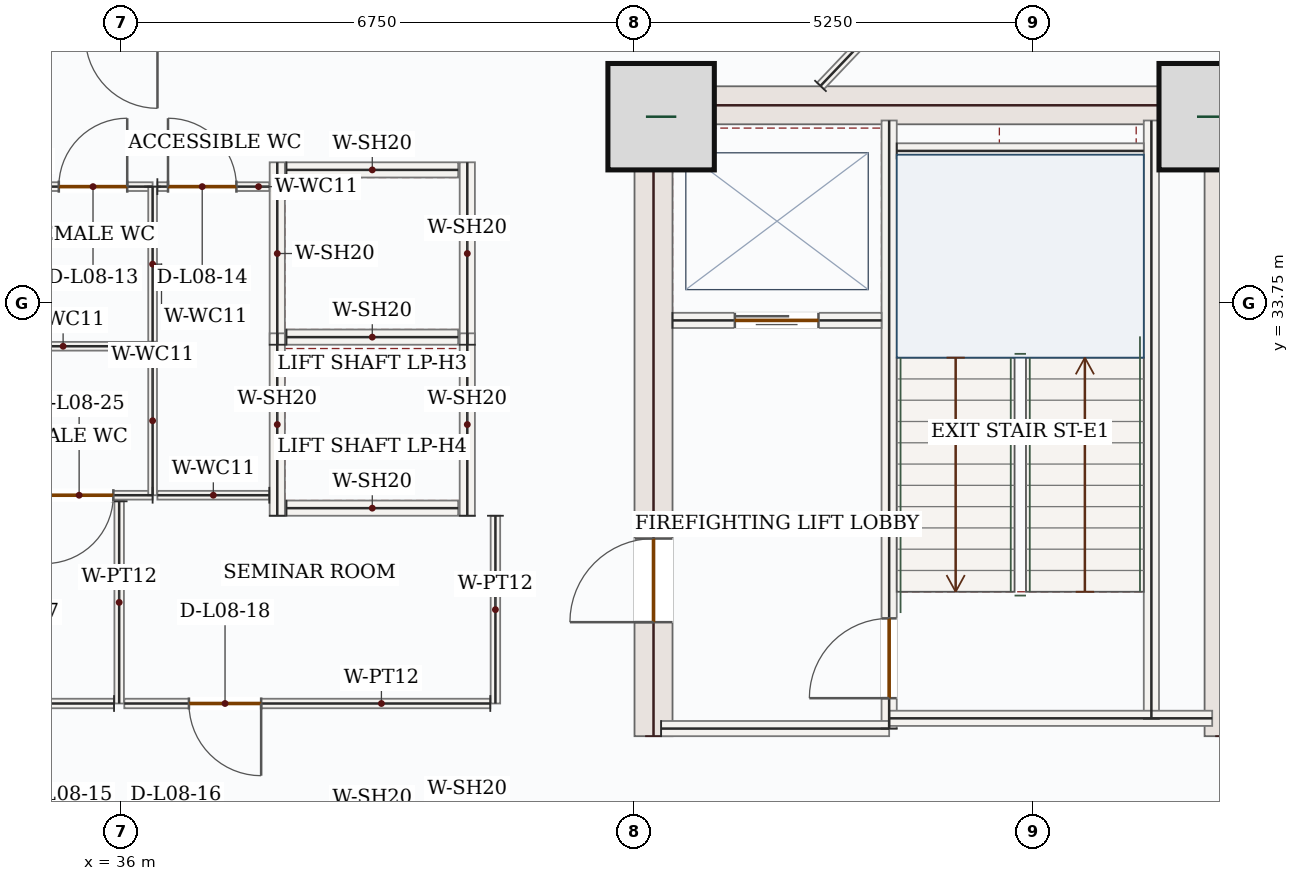
"""IFC4 building model, lengths in metres.
Left out: names, types, materials, properties, quantities, classifications, styles, units other than length and angle.
Written with IfcOpenShell. Run it as: python <this file> out.ifc"""

import sys

from ifc_helpers import new_model, si_unit, direction, frame, frame_2d, origin, origin_2d, place, context, subcontext, project, spatial, rectangle, extrude, source, transform, mapped, element, fill, save


model = new_model("IFC4")
c1 = context("Model", 3, precision=1e-05, world=origin(), true_north=direction((0.0, 1.0)))
c2 = subcontext(c1, "Body", "Model", "MODEL_VIEW")
j1 = project(units=[si_unit("LENGTHUNIT", "METRE"), si_unit("PLANEANGLEUNIT", "RADIAN")], contexts=[c1])
p1 = place(None, origin())
s1 = spatial("IfcSite", under=j1, at=p1, CompositionType="ELEMENT")
p2 = place(p1, origin())
s2 = spatial("IfcBuilding", under=s1, at=p2, CompositionType="ELEMENT")
p3 = place(p2, frame((0.0, 0.0, 41.7)))
s3 = spatial("IfcBuildingStorey", under=s2, at=p3, CompositionType="ELEMENT", Elevation=41.7)
p4 = place(p3, frame((43.0, 28.05, 0.0), z_axis=(0.0, 0.0, 1.0), x_axis=(0.0, 1.0, 0.0)))
e1 = element("IfcWall", 1, at=p4, inside=s3, PredefinedType="SHEAR", context=c2, shape_type="SweptSolid", body=[
    extrude(rectangle(XDim=8.55, YDim=0.5, at=frame_2d((4.275, 0.0))), origin(), (0.0, 0.0, 1.0), 3.95),
])
p5 = place(p4, frame((1.5, 0.0, 0.0)))
e2 = element("IfcOpeningElement", 2, at=p5, cuts=e1, PredefinedType="OPENING", context=c2, shape_type="SweptSolid", body=[
    extrude(rectangle(XDim=1.1, YDim=2.2, at=frame_2d((0.55, 1.1))), frame((0.0, 0.26, 0.0), z_axis=(0.0, -1.0, 0.0), x_axis=(1.0, 0.0, 0.0)), (0.0, 0.0, 1.0), 0.52),
])
m1 = source(origin(), c2, "Body", "SweptSolid", [
    extrude(rectangle(XDim=8.55, YDim=0.5, at=frame_2d((4.275, 0.0))), origin(), (0.0, 0.0, 1.0), 3.95),
])
p6 = place(p3, frame((50.5, 28.05, 0.0), z_axis=(0.0, 0.0, 1.0), x_axis=(0.0, 1.0, 0.0)))
e3 = element("IfcWall", 3, at=p6, inside=s3, PredefinedType="SHEAR", context=c2, shape_type="MappedRepresentation", body=[
    mapped(m1, transform((0.0, 0.0, 0.0), x_axis=(1.0, 0.0, 0.0), y_axis=(0.0, 1.0, 0.0), z_axis=(0.0, 0.0, 1.0), scale=1.0)),
])
m2 = source(origin(), c2, "Body", "SweptSolid", [
    extrude(rectangle(XDim=7.0, YDim=0.5, at=frame_2d((3.5, 0.0))), origin(), (0.0, 0.0, 1.0), 3.95),
])
p7 = place(p3, frame((43.25, 36.35, 0.0), z_axis=(0.0, 0.0, 1.0), x_axis=(1.0, 0.0, 0.0)))
e4 = element("IfcWall", 4, at=p7, inside=s3, PredefinedType="SHEAR", context=c2, shape_type="MappedRepresentation", body=[
    mapped(m2, transform((0.0, 0.0, 0.0), x_axis=(1.0, 0.0, 0.0), y_axis=(0.0, 1.0, 0.0), z_axis=(0.0, 0.0, 1.0), scale=1.0)),
])
m3 = source(origin(), c2, "Body", "SweptSolid", [
    extrude(rectangle(XDim=1.4, YDim=1.4, at=origin_2d()), origin(), (0.0, 0.0, 1.0), 4.2),
])
for number, where, z_axis, x_axis in (
    (5, (43.1, 36.2, 0.0), (0.0, 0.0, 1.0), (1.0, 0.0, 0.0)),
    (6, (50.35, 36.2, 0.0), (0.0, 0.0, 1.0), (1.0, 0.0, 0.0)),
):
    element("IfcColumn", number, at=place(p3, frame(where, z_axis=z_axis, x_axis=x_axis)), inside=s3, PredefinedType="COLUMN", context=c2, shape_type="MappedRepresentation", body=[
        mapped(m3, transform((0.0, 0.0, 0.0), x_axis=(1.0, 0.0, 0.0), y_axis=(0.0, 1.0, 0.0), z_axis=(0.0, 0.0, 1.0), scale=1.0)),
    ])
m4 = source(origin(), c2, "Body", "SweptSolid", [
    extrude(rectangle(XDim=5.258, YDim=0.32, at=frame_2d((2.629, 0.0))), origin(), (0.0, 0.0, 1.0), 3.95),
])
p8 = place(p3, frame((49.342, 39.26, 0.0), z_axis=(0.0, 0.0, 1.0), x_axis=(0.707106781187, -0.707106781187, 0.0)))
e7 = element("IfcWall", 7, at=p8, inside=s3, PredefinedType="SOLIDWALL", context=c2, shape_type="MappedRepresentation", body=[
    mapped(m4, transform((0.0, 0.0, 0.0), x_axis=(1.0, 0.0, 0.0), y_axis=(0.0, 1.0, 0.0), z_axis=(0.0, 0.0, 1.0), scale=1.0)),
])
m5 = source(origin(), c2, "Body", "SweptSolid", [
    extrude(rectangle(XDim=7.87, YDim=0.2, at=frame_2d((3.935, 0.0))), origin(), (0.0, 0.0, 1.0), 3.95),
])
p9 = place(p3, frame((49.55, 28.28, 0.0), z_axis=(0.0, 0.0, 1.0), x_axis=(0.0, 1.0, 0.0)))
e8 = element("IfcWall", 8, at=p9, inside=s3, PredefinedType="SOLIDWALL", context=c2, shape_type="MappedRepresentation", body=[
    mapped(m5, transform((0.0, 0.0, 0.0), x_axis=(1.0, 0.0, 0.0), y_axis=(0.0, 1.0, 0.0), z_axis=(0.0, 0.0, 1.0), scale=1.0)),
])
p10 = place(p3, frame((46.1, 28.15, 0.0), z_axis=(0.0, 0.0, 1.0), x_axis=(0.0, 1.0, 0.0)))
e9 = element("IfcWall", 9, at=p10, inside=s3, PredefinedType="SOLIDWALL", context=c2, shape_type="SweptSolid", body=[
    extrude(rectangle(XDim=8.0, YDim=0.2, at=frame_2d((4.0, 0.0))), origin(), (0.0, 0.0, 1.0), 3.95),
])
p11 = place(p10, frame((0.4, 0.0, 0.0)))
e10 = element("IfcOpeningElement", 10, at=p11, cuts=e9, PredefinedType="OPENING", context=c2, shape_type="SweptSolid", body=[
    extrude(rectangle(XDim=1.05, YDim=2.15, at=frame_2d((0.525, 1.075))), frame((0.0, 0.11, 0.0), z_axis=(0.0, -1.0, 0.0), x_axis=(1.0, 0.0, 0.0)), (0.0, 0.0, 1.0), 0.22),
])
m6 = source(origin(), c2, "Body", "SweptSolid", [
    extrude(rectangle(XDim=3.0, YDim=0.2, at=frame_2d((1.5, 0.0))), origin(), (0.0, 0.0, 1.0), 3.95),
])
p12 = place(p3, frame((43.1, 28.15, 0.0), z_axis=(0.0, 0.0, 1.0), x_axis=(1.0, 0.0, 0.0)))
e11 = element("IfcWall", 11, at=p12, inside=s3, PredefinedType="SOLIDWALL", context=c2, shape_type="MappedRepresentation", body=[
    mapped(m6, transform((0.0, 0.0, 0.0), x_axis=(1.0, 0.0, 0.0), y_axis=(0.0, 1.0, 0.0), z_axis=(0.0, 0.0, 1.0), scale=1.0)),
])
m7 = source(origin(), c2, "Body", "SweptSolid", [
    extrude(rectangle(XDim=4.25, YDim=0.2, at=frame_2d((2.125, 0.0))), origin(), (0.0, 0.0, 1.0), 3.95),
])
p13 = place(p3, frame((46.1, 28.285, 0.0), z_axis=(0.0, 0.0, 1.0), x_axis=(1.0, 0.0, 0.0)))
e12 = element("IfcWall", 12, at=p13, inside=s3, PredefinedType="SOLIDWALL", context=c2, shape_type="MappedRepresentation", body=[
    mapped(m7, transform((0.0, 0.0, 0.0), x_axis=(1.0, 0.0, 0.0), y_axis=(0.0, 1.0, 0.0), z_axis=(0.0, 0.0, 1.0), scale=1.0)),
])
m8 = source(origin(), c2, "Body", "SweptSolid", [
    extrude(rectangle(XDim=3.25, YDim=0.2, at=frame_2d((1.625, 0.0))), origin(), (0.0, 0.0, 1.0), 3.95),
])
p14 = place(p3, frame((46.2, 35.75, 0.0), z_axis=(0.0, 0.0, 1.0), x_axis=(1.0, 0.0, 0.0)))
e13 = element("IfcWall", 13, at=p14, inside=s3, PredefinedType="SOLIDWALL", context=c2, shape_type="MappedRepresentation", body=[
    mapped(m8, transform((0.0, 0.0, 0.0), x_axis=(1.0, 0.0, 0.0), y_axis=(0.0, 1.0, 0.0), z_axis=(0.0, 0.0, 1.0), scale=1.0)),
])
p15 = place(p3, frame((43.25, 33.52, 0.0), z_axis=(0.0, 0.0, 1.0), x_axis=(1.0, 0.0, 0.0)))
e14 = element("IfcWall", 14, at=p15, inside=s3, PredefinedType="SOLIDWALL", context=c2, shape_type="SweptSolid", body=[
    extrude(rectangle(XDim=2.75, YDim=0.2, at=frame_2d((1.375, 0.0))), origin(), (0.0, 0.0, 1.0), 3.95),
])
p16 = place(p15, frame((0.82, 0.0, 0.0)))
e15 = element("IfcOpeningElement", 15, at=p16, cuts=e14, PredefinedType="OPENING", context=c2, shape_type="SweptSolid", body=[
    extrude(rectangle(XDim=1.1, YDim=2.15, at=frame_2d((0.55, 1.075))), frame((0.0, 0.11, 0.0), z_axis=(0.0, -1.0, 0.0), x_axis=(1.0, 0.0, 0.0)), (0.0, 0.0, 1.0), 0.22),
])
m9 = source(origin(), c2, "Body", "SweptSolid", [
    extrude(rectangle(XDim=2.4, YDim=0.2, at=frame_2d((1.2, 0.0))), origin(), (0.0, 0.0, 1.0), 3.95),
])
for number, where, z_axis, x_axis in (
    (16, (38.05, 33.2, 0.0), (0.0, 0.0, 1.0), (0.0, 1.0, 0.0)),
    (17, (40.55, 33.2, 0.0), (0.0, 0.0, 1.0), (0.0, 1.0, 0.0)),
):
    element("IfcWall", number, at=place(p3, frame(where, z_axis=z_axis, x_axis=x_axis)), inside=s3, PredefinedType="SOLIDWALL", context=c2, shape_type="MappedRepresentation", body=[
        mapped(m9, transform((0.0, 0.0, 0.0), x_axis=(1.0, 0.0, 0.0), y_axis=(0.0, 1.0, 0.0), z_axis=(0.0, 0.0, 1.0), scale=1.0)),
    ])
m10 = source(origin(), c2, "Body", "SweptSolid", [
    extrude(rectangle(XDim=2.26, YDim=0.2, at=frame_2d((1.13, 0.0))), origin(), (0.0, 0.0, 1.0), 3.95),
])
for number, where, z_axis, x_axis in (
    (18, (38.17, 33.3, 0.0), (0.0, 0.0, 1.0), (1.0, 0.0, 0.0)),
    (19, (38.17, 35.5, 0.0), (0.0, 0.0, 1.0), (1.0, 0.0, 0.0)),
):
    element("IfcWall", number, at=place(p3, frame(where, z_axis=z_axis, x_axis=x_axis)), inside=s3, PredefinedType="SOLIDWALL", context=c2, shape_type="MappedRepresentation", body=[
        mapped(m10, transform((0.0, 0.0, 0.0), x_axis=(1.0, 0.0, 0.0), y_axis=(0.0, 1.0, 0.0), z_axis=(0.0, 0.0, 1.0), scale=1.0)),
    ])
for number, where, z_axis, x_axis in (
    (20, (38.05, 30.95, 0.0), (0.0, 0.0, 1.0), (0.0, 1.0, 0.0)),
    (21, (40.55, 30.95, 0.0), (0.0, 0.0, 1.0), (0.0, 1.0, 0.0)),
):
    element("IfcWall", number, at=place(p3, frame(where, z_axis=z_axis, x_axis=x_axis)), inside=s3, PredefinedType="SOLIDWALL", context=c2, shape_type="MappedRepresentation", body=[
        mapped(m9, transform((0.0, 0.0, 0.0), x_axis=(1.0, 0.0, 0.0), y_axis=(0.0, 1.0, 0.0), z_axis=(0.0, 0.0, 1.0), scale=1.0)),
    ])
p17 = place(p3, frame((38.17, 31.05, 0.0), z_axis=(0.0, 0.0, 1.0), x_axis=(1.0, 0.0, 0.0)))
e22 = element("IfcWall", 22, at=p17, inside=s3, PredefinedType="SOLIDWALL", context=c2, shape_type="MappedRepresentation", body=[
    mapped(m10, transform((0.0, 0.0, 0.0), x_axis=(1.0, 0.0, 0.0), y_axis=(0.0, 1.0, 0.0), z_axis=(0.0, 0.0, 1.0), scale=1.0)),
])
p18 = place(p3, frame((36.41, 31.22, 0.0), z_axis=(0.0, 0.0, 1.0), x_axis=(-1.0, 0.0, 0.0)))
e23 = element("IfcWall", 23, at=p18, inside=s3, PredefinedType="PARTITIONING", context=c2, shape_type="SweptSolid", body=[
    extrude(rectangle(XDim=2.355, YDim=0.115, at=frame_2d((1.177, 0.0))), origin(), (0.0, 0.0, 1.0), 3.95),
])
p19 = place(p18, frame((0.517, 0.0, 0.0)))
e24 = element("IfcOpeningElement", 24, at=p19, cuts=e23, PredefinedType="OPENING", context=c2, shape_type="SweptSolid", body=[
    extrude(rectangle(XDim=0.9, YDim=2.1, at=frame_2d((0.45, 1.05))), frame((0.0, 0.067, 0.0), z_axis=(0.0, -1.0, 0.0), x_axis=(1.0, 0.0, 0.0)), (0.0, 0.0, 1.0), 0.135),
])
m11 = source(origin(), c2, "Body", "SweptSolid", [
    extrude(rectangle(XDim=2.355, YDim=0.115, at=frame_2d((1.177, 0.0))), origin(), (0.0, 0.0, 1.0), 3.95),
])
p20 = place(p3, frame((34.055, 33.18, 0.0), z_axis=(0.0, 0.0, 1.0), x_axis=(1.0, 0.0, 0.0)))
e25 = element("IfcWall", 25, at=p20, inside=s3, PredefinedType="PARTITIONING", context=c2, shape_type="MappedRepresentation", body=[
    mapped(m11, transform((0.0, 0.0, 0.0), x_axis=(1.0, 0.0, 0.0), y_axis=(0.0, 1.0, 0.0), z_axis=(0.0, 0.0, 1.0), scale=1.0)),
])
m12 = source(origin(), c2, "Body", "SweptSolid", [
    extrude(rectangle(XDim=1.96, YDim=0.115, at=frame_2d((0.98, 0.0))), origin(), (0.0, 0.0, 1.0), 3.95),
])
p21 = place(p3, frame((36.41, 33.18, 0.0), z_axis=(0.0, 0.0, 1.0), x_axis=(0.0, -1.0, 0.0)))
e26 = element("IfcWall", 26, at=p21, inside=s3, PredefinedType="PARTITIONING", context=c2, shape_type="MappedRepresentation", body=[
    mapped(m12, transform((0.0, 0.0, 0.0), x_axis=(1.0, 0.0, 0.0), y_axis=(0.0, 1.0, 0.0), z_axis=(0.0, 0.0, 1.0), scale=1.0)),
])
p22 = place(p3, frame((34.055, 35.28, 0.0), z_axis=(0.0, 0.0, 1.0), x_axis=(1.0, 0.0, 0.0)))
e27 = element("IfcWall", 27, at=p22, inside=s3, PredefinedType="PARTITIONING", context=c2, shape_type="SweptSolid", body=[
    extrude(rectangle(XDim=2.355, YDim=0.115, at=frame_2d((1.177, 0.0))), origin(), (0.0, 0.0, 1.0), 3.95),
])
p23 = place(p22, frame((1.121, 0.0, 0.0)))
e28 = element("IfcOpeningElement", 28, at=p23, cuts=e27, PredefinedType="OPENING", context=c2, shape_type="SweptSolid", body=[
    extrude(rectangle(XDim=0.9, YDim=2.1, at=frame_2d((0.45, 1.05))), frame((0.0, 0.067, 0.0), z_axis=(0.0, -1.0, 0.0), x_axis=(1.0, 0.0, 0.0)), (0.0, 0.0, 1.0), 0.135),
])
m13 = source(origin(), c2, "Body", "SweptSolid", [
    extrude(rectangle(XDim=2.04, YDim=0.115, at=frame_2d((1.02, 0.0))), origin(), (0.0, 0.0, 1.0), 3.95),
])
p24 = place(p3, frame((36.41, 35.28, 0.0), z_axis=(0.0, 0.0, 1.0), x_axis=(0.0, -1.0, 0.0)))
e29 = element("IfcWall", 29, at=p24, inside=s3, PredefinedType="PARTITIONING", context=c2, shape_type="MappedRepresentation", body=[
    mapped(m13, transform((0.0, 0.0, 0.0), x_axis=(1.0, 0.0, 0.0), y_axis=(0.0, 1.0, 0.0), z_axis=(0.0, 0.0, 1.0), scale=1.0)),
])
m14 = source(origin(), c2, "Body", "SweptSolid", [
    extrude(rectangle(XDim=1.473, YDim=0.115, at=frame_2d((0.736, 0.0))), origin(), (0.0, 0.0, 1.0), 3.95),
])
p25 = place(p3, frame((37.945, 31.22, 0.0), z_axis=(0.0, 0.0, 1.0), x_axis=(-1.0, 0.0, 0.0)))
e30 = element("IfcWall", 30, at=p25, inside=s3, PredefinedType="PARTITIONING", context=c2, shape_type="MappedRepresentation", body=[
    mapped(m14, transform((0.0, 0.0, 0.0), x_axis=(1.0, 0.0, 0.0), y_axis=(0.0, 1.0, 0.0), z_axis=(0.0, 0.0, 1.0), scale=1.0)),
])
p26 = place(p3, frame((36.472, 35.28, 0.0), z_axis=(0.0, 0.0, 1.0), x_axis=(1.0, 0.0, 0.0)))
e31 = element("IfcWall", 31, at=p26, inside=s3, PredefinedType="PARTITIONING", context=c2, shape_type="SweptSolid", body=[
    extrude(rectangle(XDim=1.473, YDim=0.115, at=frame_2d((0.736, 0.0))), origin(), (0.0, 0.0, 1.0), 3.95),
])
p27 = place(p26, frame((0.14, 0.0, 0.0)))
e32 = element("IfcOpeningElement", 32, at=p27, cuts=e31, PredefinedType="OPENING", context=c2, shape_type="SweptSolid", body=[
    extrude(rectangle(XDim=0.9, YDim=2.1, at=frame_2d((0.45, 1.05))), frame((0.0, 0.067, 0.0), z_axis=(0.0, -1.0, 0.0), x_axis=(1.0, 0.0, 0.0)), (0.0, 0.0, 1.0), 0.135),
])
m15 = source(origin(), c2, "Body", "SweptSolid", [
    extrude(rectangle(XDim=2.66, YDim=0.125, at=frame_2d((1.33, 0.0))), origin(), (0.0, 0.0, 1.0), 3.95),
])
p28 = place(p3, frame((35.97, 31.14, 0.0), z_axis=(0.0, 0.0, 1.0), x_axis=(0.0, -1.0, 0.0)))
e33 = element("IfcWall", 33, at=p28, inside=s3, PredefinedType="PARTITIONING", context=c2, shape_type="MappedRepresentation", body=[
    mapped(m15, transform((0.0, 0.0, 0.0), x_axis=(1.0, 0.0, 0.0), y_axis=(0.0, 1.0, 0.0), z_axis=(0.0, 0.0, 1.0), scale=1.0)),
])
p29 = place(p3, frame((35.903, 28.48, 0.0), z_axis=(0.0, 0.0, 1.0), x_axis=(-1.0, 0.0, 0.0)))
e34 = element("IfcWall", 34, at=p29, inside=s3, PredefinedType="PARTITIONING", context=c2, shape_type="SweptSolid", body=[
    extrude(rectangle(XDim=4.823, YDim=0.125, at=frame_2d((2.411, 0.0))), origin(), (0.0, 0.0, 1.0), 3.95),
])
p30 = place(p29, frame((0.852, 0.0, 0.0)))
e35 = element("IfcOpeningElement", 35, at=p30, cuts=e34, PredefinedType="OPENING", context=c2, shape_type="SweptSolid", body=[
    extrude(rectangle(XDim=0.95, YDim=2.15, at=frame_2d((0.475, 1.075))), frame((0.0, 0.073, 0.0), z_axis=(0.0, -1.0, 0.0), x_axis=(1.0, 0.0, 0.0)), (0.0, 0.0, 1.0), 0.145),
])
m16 = source(origin(), c2, "Body", "SweptSolid", [
    extrude(rectangle(XDim=2.47, YDim=0.125, at=frame_2d((1.235, 0.0))), origin(), (0.0, 0.0, 1.0), 3.95),
])
p31 = place(p3, frame((40.92, 30.95, 0.0), z_axis=(0.0, 0.0, 1.0), x_axis=(0.0, -1.0, 0.0)))
e36 = element("IfcWall", 36, at=p31, inside=s3, PredefinedType="PARTITIONING", context=c2, shape_type="MappedRepresentation", body=[
    mapped(m16, transform((0.0, 0.0, 0.0), x_axis=(1.0, 0.0, 0.0), y_axis=(0.0, 1.0, 0.0), z_axis=(0.0, 0.0, 1.0), scale=1.0)),
])
p32 = place(p3, frame((40.853, 28.48, 0.0), z_axis=(0.0, 0.0, 1.0), x_axis=(-1.0, 0.0, 0.0)))
e37 = element("IfcWall", 37, at=p32, inside=s3, PredefinedType="PARTITIONING", context=c2, shape_type="SweptSolid", body=[
    extrude(rectangle(XDim=4.815, YDim=0.125, at=frame_2d((2.407, 0.0))), origin(), (0.0, 0.0, 1.0), 3.95),
])
p33 = place(p32, frame((3.015, 0.0, 0.0)))
e38 = element("IfcOpeningElement", 38, at=p33, cuts=e37, PredefinedType="OPENING", context=c2, shape_type="SweptSolid", body=[
    extrude(rectangle(XDim=0.95, YDim=2.15, at=frame_2d((0.475, 1.075))), frame((0.0, 0.073, 0.0), z_axis=(0.0, -1.0, 0.0), x_axis=(1.0, 0.0, 0.0)), (0.0, 0.0, 1.0), 0.145),
])
m17 = source(origin(), c2, "Body", "SweptSolid", [
    extrude(rectangle(XDim=3.438, YDim=0.125, at=frame_2d((1.719, 0.0))), origin(), (0.0, 0.0, 1.0), 3.95),
])
p34 = place(p3, frame((45.197, 36.605, 0.0), z_axis=(0.0, 0.0, 1.0), x_axis=(0.689493786127, 0.724291597972, 0.0)))
e39 = element("IfcWall", 39, at=p34, inside=s3, PredefinedType="PARTITIONING", context=c2, shape_type="MappedRepresentation", body=[
    mapped(m17, transform((0.0, 0.0, 0.0), x_axis=(1.0, 0.0, 0.0), y_axis=(0.0, 1.0, 0.0), z_axis=(0.0, 0.0, 1.0), scale=1.0)),
])
m18 = source(origin(), c2, "Body", "SweptSolid", [
    extrude(rectangle(XDim=1.05, YDim=2.15, at=frame_2d((0.525, 1.075))), frame((0.0, 0.025, 0.0), z_axis=(0.0, -1.0, 0.0), x_axis=(1.0, 0.0, 0.0)), (0.0, 0.0, 1.0), 0.05),
])
p35 = place(p11, origin())
e40 = element("IfcDoor", 40, at=p35, inside=s3, OperationType="SINGLE_SWING_LEFT", PredefinedType="DOOR", context=c2, shape_type="MappedRepresentation", body=[
    mapped(m18, transform((0.0, 0.0, 0.0), x_axis=(1.0, 0.0, 0.0), y_axis=(0.0, 1.0, 0.0), z_axis=(0.0, 0.0, 1.0), scale=1.0)),
])
fill(e10, e40)
m19 = source(origin(), c2, "Body", "SweptSolid", [
    extrude(rectangle(XDim=1.1, YDim=2.15, at=frame_2d((0.55, 1.075))), frame((0.0, 0.025, 0.0), z_axis=(0.0, -1.0, 0.0), x_axis=(1.0, 0.0, 0.0)), (0.0, 0.0, 1.0), 0.05),
])
p36 = place(p16, origin())
e41 = element("IfcDoor", 41, at=p36, inside=s3, OperationType="DOUBLE_DOOR_SLIDING", PredefinedType="DOOR", context=c2, shape_type="MappedRepresentation", body=[
    mapped(m19, transform((0.0, 0.0, 0.0), x_axis=(1.0, 0.0, 0.0), y_axis=(0.0, 1.0, 0.0), z_axis=(0.0, 0.0, 1.0), scale=1.0)),
])
fill(e15, e41)
m20 = source(origin(), c2, "Body", "SweptSolid", [
    extrude(rectangle(XDim=1.1, YDim=2.2, at=frame_2d((0.55, 1.1))), frame((0.0, 0.025, 0.0), z_axis=(0.0, -1.0, 0.0), x_axis=(1.0, 0.0, 0.0)), (0.0, 0.0, 1.0), 0.05),
])
p37 = place(p5, origin())
e42 = element("IfcDoor", 42, at=p37, inside=s3, OperationType="SINGLE_SWING_LEFT", PredefinedType="DOOR", context=c2, shape_type="MappedRepresentation", body=[
    mapped(m20, transform((0.0, 0.0, 0.0), x_axis=(1.0, 0.0, 0.0), y_axis=(0.0, 1.0, 0.0), z_axis=(0.0, 0.0, 1.0), scale=1.0)),
])
fill(e2, e42)
m21 = source(origin(), c2, "Body", "SweptSolid", [
    extrude(rectangle(XDim=0.9, YDim=2.1, at=frame_2d((0.45, 1.05))), frame((0.0, 0.025, 0.0), z_axis=(0.0, -1.0, 0.0), x_axis=(1.0, 0.0, 0.0)), (0.0, 0.0, 1.0), 0.05),
])
p38 = place(p23, origin())
e43 = element("IfcDoor", 43, at=p38, inside=s3, OperationType="SINGLE_SWING_RIGHT", PredefinedType="DOOR", context=c2, shape_type="MappedRepresentation", body=[
    mapped(m21, transform((0.0, 0.0, 0.0), x_axis=(1.0, 0.0, 0.0), y_axis=(0.0, 1.0, 0.0), z_axis=(0.0, 0.0, 1.0), scale=1.0)),
])
fill(e28, e43)
p39 = place(p27, origin())
e44 = element("IfcDoor", 44, at=p39, inside=s3, OperationType="SINGLE_SWING_LEFT", PredefinedType="DOOR", context=c2, shape_type="MappedRepresentation", body=[
    mapped(m21, transform((0.0, 0.0, 0.0), x_axis=(1.0, 0.0, 0.0), y_axis=(0.0, 1.0, 0.0), z_axis=(0.0, 0.0, 1.0), scale=1.0)),
])
fill(e32, e44)
m22 = source(origin(), c2, "Body", "SweptSolid", [
    extrude(rectangle(XDim=0.95, YDim=2.15, at=frame_2d((0.475, 1.075))), frame((0.0, 0.025, 0.0), z_axis=(0.0, -1.0, 0.0), x_axis=(1.0, 0.0, 0.0)), (0.0, 0.0, 1.0), 0.05),
])
p40 = place(p33, origin())
e45 = element("IfcDoor", 45, at=p40, inside=s3, OperationType="SINGLE_SWING_LEFT", PredefinedType="DOOR", context=c2, shape_type="MappedRepresentation", body=[
    mapped(m22, transform((0.0, 0.0, 0.0), x_axis=(1.0, 0.0, 0.0), y_axis=(0.0, 1.0, 0.0), z_axis=(0.0, 0.0, 1.0), scale=1.0)),
])
fill(e38, e45)
p41 = place(p19, origin())
e46 = element("IfcDoor", 46, at=p41, inside=s3, OperationType="SINGLE_SWING_RIGHT", PredefinedType="DOOR", context=c2, shape_type="MappedRepresentation", body=[
    mapped(m21, transform((0.0, 0.0, 0.0), x_axis=(1.0, 0.0, 0.0), y_axis=(0.0, 1.0, 0.0), z_axis=(0.0, 0.0, 1.0), scale=1.0)),
])
fill(e24, e46)
save(model, sys.argv[1])
